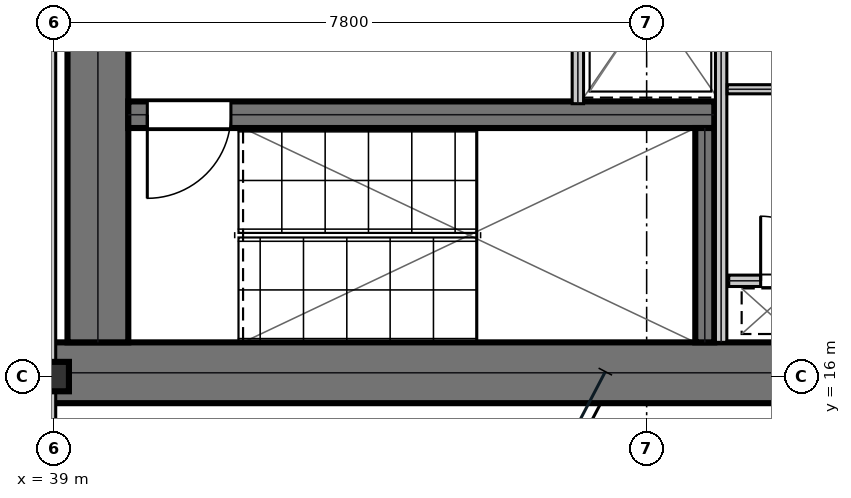
"""IFC4 building model, lengths in metres.
Left out: names, types, materials, properties, quantities, classifications, styles, units other than length and angle.
Written with IfcOpenShell. Run it as: python <this file> out.ifc"""

import sys

from ifc_helpers import new_model, si_unit, direction, frame, frame_2d, origin, origin_2d, place, context, subcontext, project, spatial, rectangle, i_section, extrude, element, fill, save


model = new_model("IFC4")
c1 = context("Model", 3, precision=1e-05, world=origin(), true_north=direction((0.0, 1.0)))
c2 = subcontext(c1, "Body", "Model", "MODEL_VIEW")
j1 = project(units=[si_unit("LENGTHUNIT", "METRE"), si_unit("PLANEANGLEUNIT", "RADIAN")], contexts=[c1])
p1 = place(None, origin())
s1 = spatial("IfcSite", under=j1, at=p1, CompositionType="ELEMENT")
p2 = place(p1, origin())
s2 = spatial("IfcBuilding", under=s1, at=p2, CompositionType="ELEMENT")
p3 = place(p2, frame((0.0, 0.0, 149.25)))
s3 = spatial("IfcBuildingStorey", under=s2, at=p3, CompositionType="ELEMENT", Elevation=149.25)
p4 = place(p3, frame((38.8, 16.05, 0.0), z_axis=(0.0, 0.0, 1.0), x_axis=(1.0, 0.0, 0.0)))
e1 = element("IfcWall", 1, at=p4, inside=s3, PredefinedType="SHEAR", context=c2, shape_type="SweptSolid", body=[
    extrude(rectangle(XDim=16.0, YDim=0.8, at=frame_2d((8.0, 0.0))), origin(), (0.0, 0.0, 1.0), 3.81),
])
p5 = place(p3, frame((39.58, 16.45, 0.0), z_axis=(0.0, 0.0, 1.0), x_axis=(0.0, 1.0, 0.0)))
e2 = element("IfcWall", 2, at=p5, inside=s3, PredefinedType="SHEAR", context=c2, shape_type="SweptSolid", body=[
    extrude(rectangle(XDim=6.15, YDim=0.8, at=frame_2d((3.075, 0.0))), origin(), (0.0, 0.0, 1.0), 3.81),
])
p6 = place(p3, frame((39.98, 19.445, 0.0), z_axis=(0.0, 0.0, 1.0), x_axis=(1.0, 0.0, 0.0)))
e3 = element("IfcWall", 3, at=p6, inside=s3, PredefinedType="SHEAR", context=c2, shape_type="SweptSolid", body=[
    extrude(rectangle(XDim=7.71, YDim=0.35, at=frame_2d((3.855, 0.0))), origin(), (0.0, 0.0, 1.0), 3.81),
])
p7 = place(p6, frame((0.25, 0.0, 0.0)))
e4 = element("IfcOpeningElement", 4, at=p7, cuts=e3, PredefinedType="OPENING", context=c2, shape_type="SweptSolid", body=[
    extrude(rectangle(XDim=1.1, YDim=2.15, at=frame_2d((0.55, 1.075))), frame((0.0, 0.185, 0.0), z_axis=(0.0, -1.0, 0.0), x_axis=(1.0, 0.0, 0.0)), (0.0, 0.0, 1.0), 0.37),
])
p8 = place(p3, frame((47.565, 16.45, 0.0), z_axis=(0.0, 0.0, 1.0), x_axis=(0.0, 1.0, 0.0)))
e5 = element("IfcWall", 5, at=p8, inside=s3, PredefinedType="SHEAR", context=c2, shape_type="SweptSolid", body=[
    extrude(rectangle(XDim=2.82, YDim=0.25, at=frame_2d((1.41, 0.0))), origin(), (0.0, 0.0, 1.0), 3.81),
])
p9 = place(p3, frame((39.0, 16.0, 0.0), z_axis=(0.0, 0.0, 1.0), x_axis=(1.0, 0.0, 0.0)))
e6 = element("IfcColumn", 6, at=p9, inside=s3, PredefinedType="COLUMN", context=c2, shape_type="SweptSolid", body=[
    extrude(i_section(OverallWidth=0.398, OverallDepth=0.387, WebThickness=0.021, FlangeThickness=0.033, at=origin_2d()), origin(), (0.0, 0.0, 1.0), 4.044),
])
p10 = place(p3, frame((45.895, 19.59, 0.0), z_axis=(0.0, 0.0, 1.0), x_axis=(0.0, 1.0, 0.0)))
e7 = element("IfcWall", 7, at=p10, inside=s3, PredefinedType="PARTITIONING", context=c2, shape_type="SweptSolid", body=[
    extrude(rectangle(XDim=2.72, YDim=0.15, at=frame_2d((1.36, 0.0))), origin(), (0.0, 0.0, 1.0), 3.81),
])
p11 = place(p10, frame((0.81, 0.0, 0.0)))
e8 = element("IfcOpeningElement", 8, at=p11, cuts=e7, PredefinedType="OPENING", context=c2, shape_type="SweptSolid", body=[
    extrude(rectangle(XDim=1.1, YDim=2.15, at=frame_2d((0.55, 1.075))), frame((0.0, 0.085, 0.0), z_axis=(0.0, -1.0, 0.0), x_axis=(1.0, 0.0, 0.0)), (0.0, 0.0, 1.0), 0.17),
])
p12 = place(p3, frame((47.88, 17.26, 0.0), z_axis=(0.0, 0.0, 1.0), x_axis=(1.0, 0.0, 0.0)))
e9 = element("IfcWall", 9, at=p12, inside=s3, PredefinedType="PARTITIONING", context=c2, shape_type="SweptSolid", body=[
    extrude(rectangle(XDim=1.72, YDim=0.15, at=frame_2d((0.86, 0.0))), origin(), (0.0, 0.0, 1.0), 3.81),
])
p13 = place(p12, frame((0.42, 0.0, 0.0)))
e10 = element("IfcOpeningElement", 10, at=p13, cuts=e9, PredefinedType="OPENING", context=c2, shape_type="SweptSolid", body=[
    extrude(rectangle(XDim=0.85, YDim=2.15, at=frame_2d((0.425, 1.075))), frame((0.0, 0.085, 0.0), z_axis=(0.0, -1.0, 0.0), x_axis=(1.0, 0.0, 0.0)), (0.0, 0.0, 1.0), 0.17),
])
p14 = place(p3, frame((47.78, 16.45, 0.0), z_axis=(0.0, 0.0, 1.0), x_axis=(0.0, 1.0, 0.0)))
e11 = element("IfcWall", 11, at=p14, inside=s3, PredefinedType="PARTITIONING", context=c2, shape_type="SweptSolid", body=[
    extrude(rectangle(XDim=5.975, YDim=0.15, at=frame_2d((2.988, 0.0))), origin(), (0.0, 0.0, 1.0), 3.81),
])
p15 = place(p3, frame((47.86, 19.78, 0.0), z_axis=(0.0, 0.0, 1.0), x_axis=(1.0, 0.0, 0.0)))
e12 = element("IfcWall", 12, at=p15, inside=s3, PredefinedType="PARTITIONING", context=c2, shape_type="SweptSolid", body=[
    extrude(rectangle(XDim=1.76, YDim=0.12, at=frame_2d((0.88, 0.0))), origin(), (0.0, 0.0, 1.0), 3.81),
])
p16 = place(p3, frame((38.95, 14.5, 0.0), z_axis=(0.0, 0.0, 1.0), x_axis=(0.0, 1.0, 0.0)))
e13 = element("IfcWall", 13, at=p16, inside=s3, PredefinedType="PARTITIONING", context=c2, shape_type="SweptSolid", body=[
    extrude(rectangle(XDim=8.2, YDim=0.15, at=frame_2d((4.1, 0.0))), origin(), (0.0, 0.0, 1.0), 3.19),
])
p17 = place(p13, origin())
e14 = element("IfcDoor", 14, at=p17, inside=s3, OperationType="SINGLE_SWING_LEFT", PredefinedType="TRAPDOOR", context=c2, shape_type="SweptSolid", body=[
    extrude(rectangle(XDim=0.85, YDim=2.15, at=frame_2d((0.425, 1.075))), frame((0.0, 0.025, 0.0), z_axis=(0.0, -1.0, 0.0), x_axis=(1.0, 0.0, 0.0)), (0.0, 0.0, 1.0), 0.05),
])
fill(e10, e14)
p18 = place(p7, frame((1.1, 0.0, 0.0), z_axis=(0.0, 0.0, 1.0), x_axis=(-1.0, 0.0, 0.0)))
e15 = element("IfcDoor", 15, at=p18, inside=s3, OperationType="SINGLE_SWING_RIGHT", PredefinedType="DOOR", context=c2, shape_type="SweptSolid", body=[
    extrude(rectangle(XDim=1.1, YDim=2.15, at=frame_2d((0.55, 1.075))), frame((0.0, 0.025, 0.0), z_axis=(0.0, -1.0, 0.0), x_axis=(1.0, 0.0, 0.0)), (0.0, 0.0, 1.0), 0.05),
])
fill(e4, e15)
save(model, sys.argv[1])
